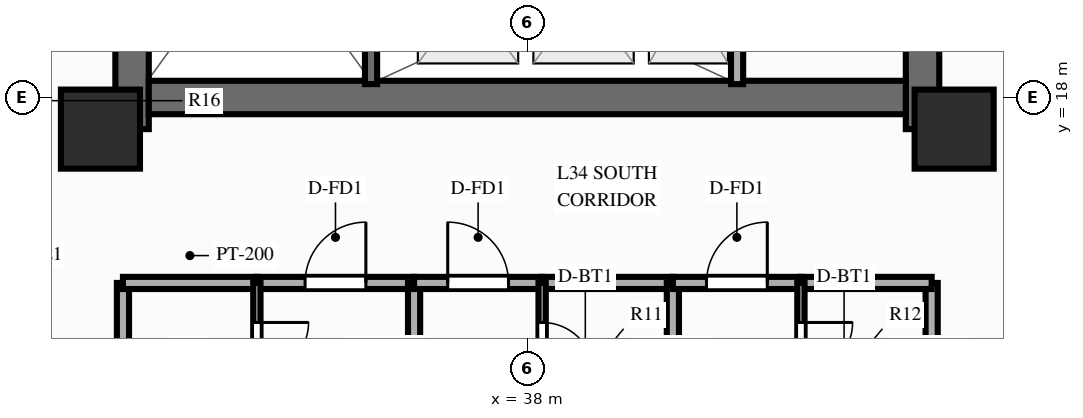
"""IFC4 building model, lengths in metres.
Left out: names, types, materials, properties, quantities, classifications, styles, units other than length and angle.
Written with IfcOpenShell. Run it as: python <this file> out.ifc"""

import sys

from ifc_helpers import new_model, si_unit, direction, frame, frame_2d, origin, origin_2d, place, context, subcontext, project, spatial, rectangle, extrude, source, transform, mapped, element, fill, save


model = new_model("IFC4")
c1 = context("Model", 3, precision=1e-05, world=origin(), true_north=direction((0.0, 1.0)))
c2 = subcontext(c1, "Body", "Model", "MODEL_VIEW")
j1 = project(units=[si_unit("LENGTHUNIT", "METRE"), si_unit("PLANEANGLEUNIT", "RADIAN")], contexts=[c1])
p1 = place(None, origin())
s1 = spatial("IfcSite", under=j1, at=p1, CompositionType="ELEMENT")
p2 = place(p1, origin())
s2 = spatial("IfcBuilding", under=s1, at=p2, CompositionType="ELEMENT")
p3 = place(p2, frame((0.0, 0.0, 107.85)))
s3 = spatial("IfcBuildingStorey", under=s2, at=p3, CompositionType="ELEMENT", Elevation=107.85)
p4 = place(p3, frame((31.5, 17.48, 0.0), z_axis=(0.0, 0.0, 1.0), x_axis=(0.0, 1.0, 0.0)))
e1 = element("IfcWall", 1, at=p4, inside=s3, PredefinedType="SHEAR", context=c2, shape_type="SweptSolid", body=[
    extrude(rectangle(XDim=19.04, YDim=0.55, at=frame_2d((9.52, 0.0))), origin(), (0.0, 0.0, 1.0), 3.0),
])
p5 = place(p4, frame((6.32, 0.0, 0.0)))
e2 = element("IfcOpeningElement", 2, at=p5, cuts=e1, PredefinedType="OPENING", context=c2, shape_type="SweptSolid", body=[
    extrude(rectangle(XDim=1.1, YDim=2.15, at=frame_2d((0.55, 1.075))), frame((0.0, 0.287, 0.0), z_axis=(0.0, -1.0, 0.0), x_axis=(1.0, 0.0, 0.0)), (0.0, 0.0, 1.0), 0.574),
])
p6 = place(p3, frame((44.5, 17.48, 0.0), z_axis=(0.0, 0.0, 1.0), x_axis=(0.0, 1.0, 0.0)))
e3 = element("IfcWall", 3, at=p6, inside=s3, PredefinedType="SHEAR", context=c2, shape_type="SweptSolid", body=[
    extrude(rectangle(XDim=19.04, YDim=0.55, at=frame_2d((9.52, 0.0))), origin(), (0.0, 0.0, 1.0), 3.0),
])
p7 = place(p6, frame((12.67, 0.0, 0.0), z_axis=(0.0, 0.0, 1.0), x_axis=(-1.0, 0.0, 0.0)))
e4 = element("IfcOpeningElement", 4, at=p7, cuts=e3, PredefinedType="OPENING", context=c2, shape_type="SweptSolid", body=[
    extrude(rectangle(XDim=1.1, YDim=2.15, at=frame_2d((0.55, 1.075))), frame((0.0, 0.287, 0.0), z_axis=(0.0, -1.0, 0.0), x_axis=(1.0, 0.0, 0.0)), (0.0, 0.0, 1.0), 0.574),
])
p8 = place(p3, frame((31.775, 18.0, 0.0), z_axis=(0.0, 0.0, 1.0), x_axis=(1.0, 0.0, 0.0)))
e5 = element("IfcWall", 5, at=p8, inside=s3, PredefinedType="SHEAR", context=c2, shape_type="SweptSolid", body=[
    extrude(rectangle(XDim=12.45, YDim=0.55, at=frame_2d((6.225, 0.0))), origin(), (0.0, 0.0, 1.0), 3.0),
])
m1 = source(origin(), c2, "Body", "SweptSolid", [
    extrude(rectangle(XDim=1.3, YDim=1.3, at=origin_2d()), origin(), (0.0, 0.0, 1.0), 3.0),
])
for number, where, z_axis, x_axis in (
    (6, (30.98, 17.48, 0.0), (0.0, 0.0, 1.0), (1.0, 0.0, 0.0)),
    (7, (45.02, 17.48, 0.0), (0.0, 0.0, 1.0), (1.0, 0.0, 0.0)),
):
    element("IfcColumn", number, at=place(p3, frame(where, z_axis=z_axis, x_axis=x_axis)), inside=s3, PredefinedType="COLUMN", context=c2, shape_type="MappedRepresentation", body=[
        mapped(m1, transform((0.0, 0.0, 0.0), scale=1.0)),
    ])
p9 = place(p3, frame((41.45, 18.22, 0.0), z_axis=(0.0, 0.0, 1.0), x_axis=(0.0, 1.0, 0.0)))
e8 = element("IfcWall", 8, at=p9, inside=s3, PredefinedType="PARTITIONING", context=c2, shape_type="SweptSolid", body=[
    extrude(rectangle(XDim=2.86, YDim=0.2, at=frame_2d((1.43, 0.0))), origin(), (0.0, 0.0, 1.0), 2.79),
])
p10 = place(p3, frame((35.43, 18.22, 0.0), z_axis=(0.0, 0.0, 1.0), x_axis=(0.0, 1.0, 0.0)))
e9 = element("IfcWall", 9, at=p10, inside=s3, PredefinedType="SOLIDWALL", context=c2, shape_type="SweptSolid", body=[
    extrude(rectangle(XDim=7.22, YDim=0.2, at=frame_2d((3.61, 0.0))), origin(), (0.0, 0.0, 1.0), 2.79),
])
p11 = place(p10, frame((6.68, 0.0, 0.0), z_axis=(0.0, 0.0, 1.0), x_axis=(-1.0, 0.0, 0.0)))
e10 = element("IfcOpeningElement", 10, at=p11, cuts=e9, PredefinedType="OPENING", context=c2, shape_type="SweptSolid", body=[
    extrude(rectangle(XDim=1.1, YDim=2.15, at=frame_2d((0.55, 1.075))), frame((0.0, 0.112, 0.0), z_axis=(0.0, -1.0, 0.0), x_axis=(1.0, 0.0, 0.0)), (0.0, 0.0, 1.0), 0.224),
])
for number, where, z_axis, x_axis in (
    (11, (31.35, 14.95, 0.0), (0.0, 0.0, 1.0), (0.0, -1.0, 0.0)),
    (12, (44.65, 14.95, 0.0), (0.0, 0.0, 1.0), (0.0, -1.0, 0.0)),
):
    element("IfcWall", number, at=place(p3, frame(where, z_axis=z_axis, x_axis=x_axis)), inside=s3, PredefinedType="PARTITIONING", context=c2, shape_type="SweptSolid", body=[
        extrude(rectangle(XDim=11.8, YDim=0.2, at=frame_2d((5.9, 0.0))), origin(), (0.0, 0.0, 1.0), 2.34),
    ])
p12 = place(p3, frame((31.35, 14.95, 0.0), z_axis=(0.0, 0.0, 1.0), x_axis=(1.0, 0.0, 0.0)))
e13 = element("IfcWall", 13, at=p12, inside=s3, PredefinedType="PARTITIONING", context=c2, shape_type="SweptSolid", body=[
    extrude(rectangle(XDim=2.202, YDim=0.2, at=frame_2d((1.101, 0.0))), origin(), (0.0, 0.0, 1.0), 2.79),
])
p13 = place(p3, frame((33.552, 14.95, 0.0), z_axis=(0.0, 0.0, 1.0), x_axis=(1.0, 0.0, 0.0)))
e14 = element("IfcWall", 14, at=p13, inside=s3, PredefinedType="PARTITIONING", context=c2, shape_type="SweptSolid", body=[
    extrude(rectangle(XDim=2.585, YDim=0.2, at=frame_2d((1.293, 0.0))), origin(), (0.0, 0.0, 1.0), 2.79),
])
p14 = place(p13, frame((0.793, 0.0, 0.0)))
e15 = element("IfcOpeningElement", 15, at=p14, cuts=e14, PredefinedType="OPENING", context=c2, shape_type="SweptSolid", body=[
    extrude(rectangle(XDim=1.0, YDim=2.15, at=frame_2d((0.5, 1.075))), frame((0.0, 0.112, 0.0), z_axis=(0.0, -1.0, 0.0), x_axis=(1.0, 0.0, 0.0)), (0.0, 0.0, 1.0), 0.224),
])
p15 = place(p3, frame((33.552, 14.95, 0.0), z_axis=(0.0, 0.0, 1.0), x_axis=(0.0, -1.0, 0.0)))
e16 = element("IfcWall", 16, at=p15, inside=s3, PredefinedType="PARTITIONING", context=c2, shape_type="SweptSolid", body=[
    extrude(rectangle(XDim=2.15, YDim=0.12, at=frame_2d((1.075, 0.0))), origin(), (0.0, 0.0, 1.0), 2.79),
])
p16 = place(p15, frame((0.65, 0.0, 0.0)))
e17 = element("IfcOpeningElement", 17, at=p16, cuts=e16, PredefinedType="OPENING", context=c2, shape_type="SweptSolid", body=[
    extrude(rectangle(XDim=0.85, YDim=2.05, at=frame_2d((0.425, 1.025))), frame((0.0, 0.072, 0.0), z_axis=(0.0, -1.0, 0.0), x_axis=(1.0, 0.0, 0.0)), (0.0, 0.0, 1.0), 0.144),
])
p17 = place(p3, frame((36.138, 14.95, 0.0), z_axis=(0.0, 0.0, 1.0), x_axis=(0.0, -1.0, 0.0)))
e18 = element("IfcWall", 18, at=p17, inside=s3, PredefinedType="PARTITIONING", context=c2, shape_type="SweptSolid", body=[
    extrude(rectangle(XDim=11.8, YDim=0.2, at=frame_2d((5.9, 0.0))), origin(), (0.0, 0.0, 1.0), 2.79),
])
p18 = place(p3, frame((36.138, 14.95, 0.0), z_axis=(0.0, 0.0, 1.0), x_axis=(1.0, 0.0, 0.0)))
e19 = element("IfcWall", 19, at=p18, inside=s3, PredefinedType="PARTITIONING", context=c2, shape_type="SweptSolid", body=[
    extrude(rectangle(XDim=2.106, YDim=0.2, at=frame_2d((1.053, 0.0))), origin(), (0.0, 0.0, 1.0), 2.79),
])
p19 = place(p18, frame((0.553, 0.0, 0.0)))
e20 = element("IfcOpeningElement", 20, at=p19, cuts=e19, PredefinedType="OPENING", context=c2, shape_type="SweptSolid", body=[
    extrude(rectangle(XDim=1.0, YDim=2.15, at=frame_2d((0.5, 1.075))), frame((0.0, 0.112, 0.0), z_axis=(0.0, -1.0, 0.0), x_axis=(1.0, 0.0, 0.0)), (0.0, 0.0, 1.0), 0.224),
])
p20 = place(p3, frame((38.244, 14.95, 0.0), z_axis=(0.0, 0.0, 1.0), x_axis=(1.0, 0.0, 0.0)))
e21 = element("IfcWall", 21, at=p20, inside=s3, PredefinedType="PARTITIONING", context=c2, shape_type="SweptSolid", body=[
    extrude(rectangle(XDim=2.15, YDim=0.2, at=frame_2d((1.075, 0.0))), origin(), (0.0, 0.0, 1.0), 2.79),
])
p21 = place(p3, frame((38.244, 14.95, 0.0), z_axis=(0.0, 0.0, 1.0), x_axis=(0.0, -1.0, 0.0)))
e22 = element("IfcWall", 22, at=p21, inside=s3, PredefinedType="PARTITIONING", context=c2, shape_type="SweptSolid", body=[
    extrude(rectangle(XDim=2.15, YDim=0.12, at=frame_2d((1.075, 0.0))), origin(), (0.0, 0.0, 1.0), 2.79),
])
p22 = place(p21, frame((0.65, 0.0, 0.0)))
e23 = element("IfcOpeningElement", 23, at=p22, cuts=e22, PredefinedType="OPENING", context=c2, shape_type="SweptSolid", body=[
    extrude(rectangle(XDim=0.85, YDim=2.05, at=frame_2d((0.425, 1.025))), frame((0.0, 0.072, 0.0), z_axis=(0.0, -1.0, 0.0), x_axis=(1.0, 0.0, 0.0)), (0.0, 0.0, 1.0), 0.144),
])
p23 = place(p3, frame((40.394, 14.95, 0.0), z_axis=(0.0, 0.0, 1.0), x_axis=(0.0, -1.0, 0.0)))
e24 = element("IfcWall", 24, at=p23, inside=s3, PredefinedType="PARTITIONING", context=c2, shape_type="SweptSolid", body=[
    extrude(rectangle(XDim=11.8, YDim=0.2, at=frame_2d((5.9, 0.0))), origin(), (0.0, 0.0, 1.0), 2.79),
])
p24 = place(p3, frame((40.394, 14.95, 0.0), z_axis=(0.0, 0.0, 1.0), x_axis=(1.0, 0.0, 0.0)))
e25 = element("IfcWall", 25, at=p24, inside=s3, PredefinedType="PARTITIONING", context=c2, shape_type="SweptSolid", body=[
    extrude(rectangle(XDim=2.106, YDim=0.2, at=frame_2d((1.053, 0.0))), origin(), (0.0, 0.0, 1.0), 2.79),
])
p25 = place(p24, frame((0.553, 0.0, 0.0)))
e26 = element("IfcOpeningElement", 26, at=p25, cuts=e25, PredefinedType="OPENING", context=c2, shape_type="SweptSolid", body=[
    extrude(rectangle(XDim=1.0, YDim=2.15, at=frame_2d((0.5, 1.075))), frame((0.0, 0.112, 0.0), z_axis=(0.0, -1.0, 0.0), x_axis=(1.0, 0.0, 0.0)), (0.0, 0.0, 1.0), 0.224),
])
p26 = place(p3, frame((42.5, 14.95, 0.0), z_axis=(0.0, 0.0, 1.0), x_axis=(1.0, 0.0, 0.0)))
e27 = element("IfcWall", 27, at=p26, inside=s3, PredefinedType="PARTITIONING", context=c2, shape_type="SweptSolid", body=[
    extrude(rectangle(XDim=2.15, YDim=0.2, at=frame_2d((1.075, 0.0))), origin(), (0.0, 0.0, 1.0), 2.79),
])
p27 = place(p3, frame((42.5, 14.95, 0.0), z_axis=(0.0, 0.0, 1.0), x_axis=(0.0, -1.0, 0.0)))
e28 = element("IfcWall", 28, at=p27, inside=s3, PredefinedType="PARTITIONING", context=c2, shape_type="SweptSolid", body=[
    extrude(rectangle(XDim=2.15, YDim=0.12, at=frame_2d((1.075, 0.0))), origin(), (0.0, 0.0, 1.0), 2.79),
])
p28 = place(p27, frame((0.65, 0.0, 0.0)))
e29 = element("IfcOpeningElement", 29, at=p28, cuts=e28, PredefinedType="OPENING", context=c2, shape_type="SweptSolid", body=[
    extrude(rectangle(XDim=0.85, YDim=2.05, at=frame_2d((0.425, 1.025))), frame((0.0, 0.072, 0.0), z_axis=(0.0, -1.0, 0.0), x_axis=(1.0, 0.0, 0.0)), (0.0, 0.0, 1.0), 0.144),
])
m2 = source(origin(), c2, "Body", "SweptSolid", [
    extrude(rectangle(XDim=1.0, YDim=2.15, at=frame_2d((0.5, 1.075))), frame((0.0, 0.025, 0.0), z_axis=(0.0, -1.0, 0.0), x_axis=(1.0, 0.0, 0.0)), (0.0, 0.0, 1.0), 0.05),
])
p29 = place(p14, origin())
e30 = element("IfcDoor", 30, at=p29, inside=s3, OperationType="SINGLE_SWING_RIGHT", PredefinedType="DOOR", context=c2, shape_type="MappedRepresentation", body=[
    mapped(m2, transform((0.0, 0.0, 0.0), scale=1.0)),
])
fill(e15, e30)
m3 = source(origin(), c2, "Body", "SweptSolid", [
    extrude(rectangle(XDim=0.85, YDim=2.05, at=frame_2d((0.425, 1.025))), frame((0.0, 0.025, 0.0), z_axis=(0.0, -1.0, 0.0), x_axis=(1.0, 0.0, 0.0)), (0.0, 0.0, 1.0), 0.05),
])
p30 = place(p16, origin())
e31 = element("IfcDoor", 31, at=p30, inside=s3, OperationType="SINGLE_SWING_LEFT", PredefinedType="DOOR", context=c2, shape_type="MappedRepresentation", body=[
    mapped(m3, transform((0.0, 0.0, 0.0), scale=1.0)),
])
fill(e17, e31)
p31 = place(p19, origin())
e32 = element("IfcDoor", 32, at=p31, inside=s3, OperationType="SINGLE_SWING_LEFT", PredefinedType="DOOR", context=c2, shape_type="MappedRepresentation", body=[
    mapped(m2, transform((0.0, 0.0, 0.0), scale=1.0)),
])
fill(e20, e32)
p32 = place(p22, origin())
e33 = element("IfcDoor", 33, at=p32, inside=s3, OperationType="SINGLE_SWING_RIGHT", PredefinedType="DOOR", context=c2, shape_type="MappedRepresentation", body=[
    mapped(m3, transform((0.0, 0.0, 0.0), scale=1.0)),
])
fill(e23, e33)
p33 = place(p25, origin())
e34 = element("IfcDoor", 34, at=p33, inside=s3, OperationType="SINGLE_SWING_RIGHT", PredefinedType="DOOR", context=c2, shape_type="MappedRepresentation", body=[
    mapped(m2, transform((0.0, 0.0, 0.0), scale=1.0)),
])
fill(e26, e34)
p34 = place(p28, origin())
e35 = element("IfcDoor", 35, at=p34, inside=s3, OperationType="SINGLE_SWING_LEFT", PredefinedType="DOOR", context=c2, shape_type="MappedRepresentation", body=[
    mapped(m3, transform((0.0, 0.0, 0.0), scale=1.0)),
])
fill(e29, e35)
save(model, sys.argv[1])
